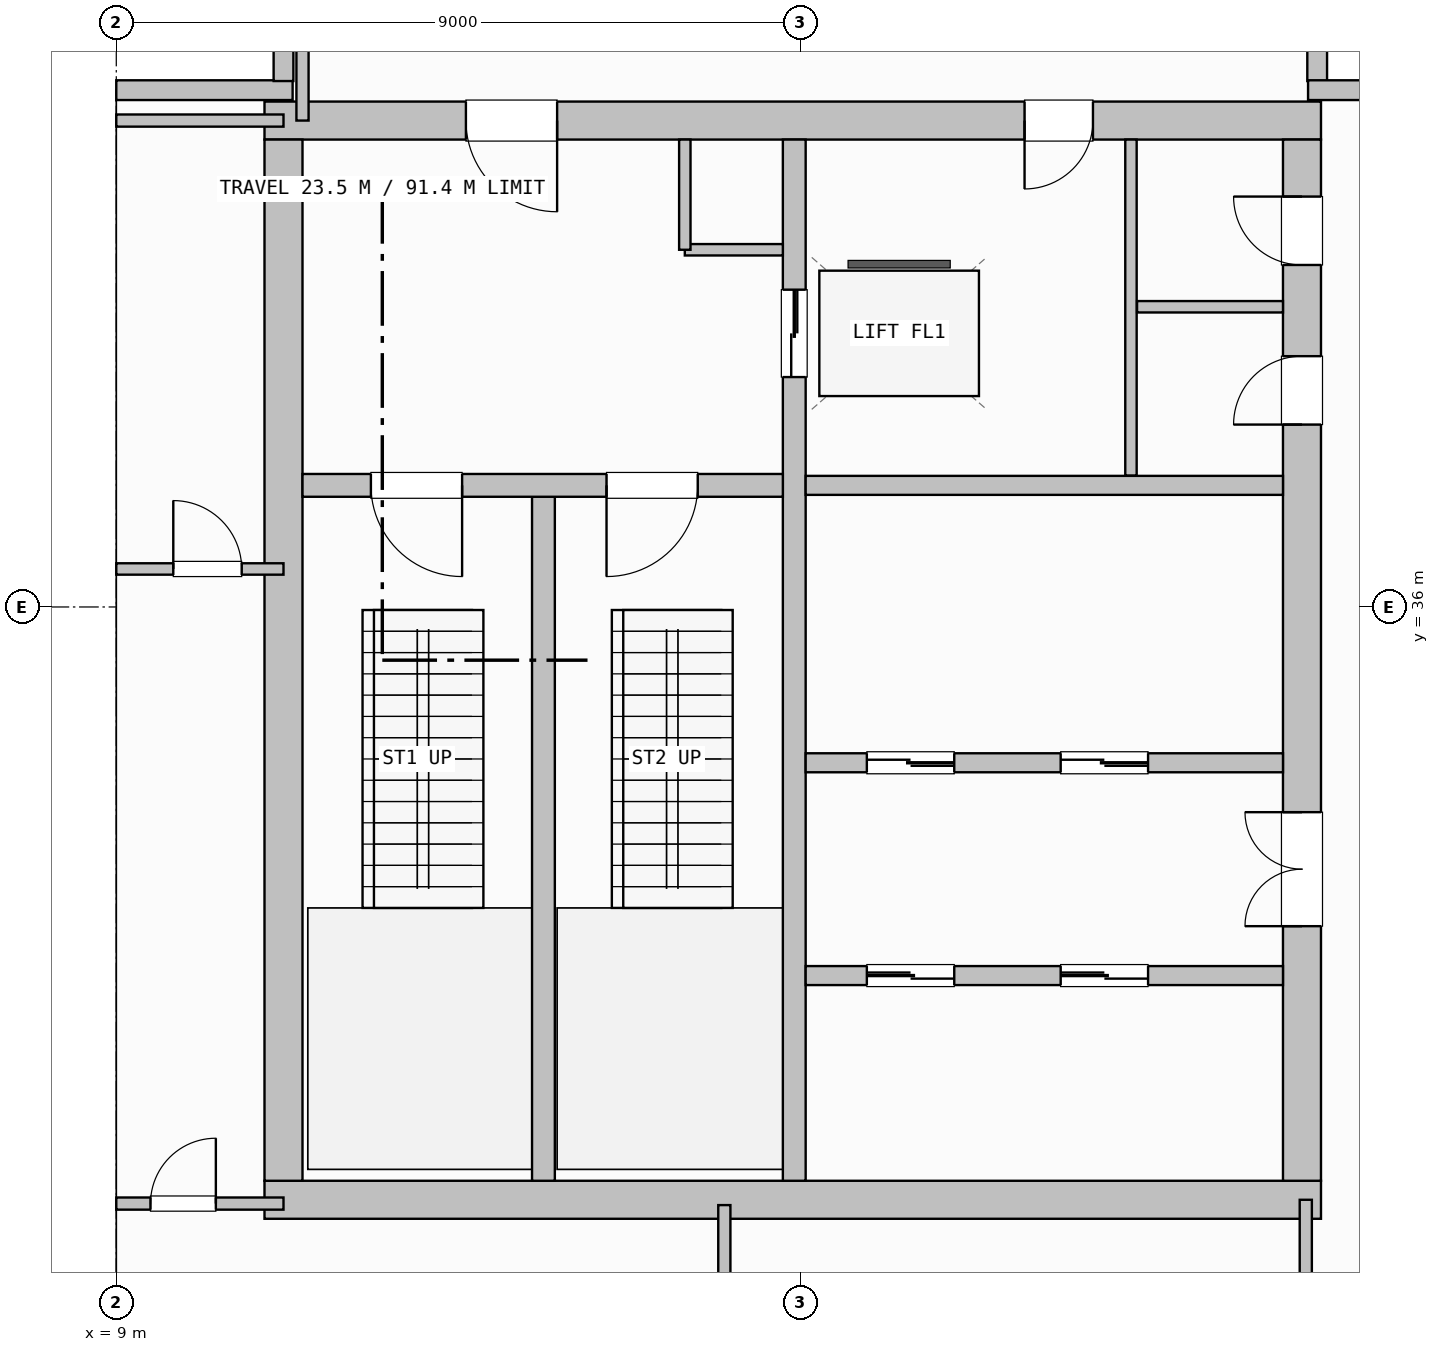
"""IFC4 building model, lengths in metres.
Left out: names, types, materials, properties, quantities, classifications, styles, units other than length and angle.
Written with IfcOpenShell. Run it as: python <this file> out.ifc"""

import sys

from ifc_helpers import new_model, si_unit, direction, frame, frame_2d, origin, origin_2d, place, context, subcontext, project, spatial, rectangle, i_section, extrude, element, fill, save


model = new_model("IFC4")
c1 = context("Model", 3, precision=1e-05, world=origin(), true_north=direction((0.0, 1.0)))
c2 = subcontext(c1, "Body", "Model", "MODEL_VIEW")
j1 = project(units=[si_unit("LENGTHUNIT", "METRE"), si_unit("PLANEANGLEUNIT", "RADIAN")], contexts=[c1])
p1 = place(None, origin())
s1 = spatial("IfcSite", under=j1, at=p1, CompositionType="ELEMENT")
p2 = place(p1, origin())
s2 = spatial("IfcBuilding", under=s1, at=p2, CompositionType="ELEMENT")
p3 = place(p2, frame((0.0, 0.0, 201.2)))
s3 = spatial("IfcBuildingStorey", under=s2, at=p3, CompositionType="ELEMENT", Elevation=201.2)
p4 = place(p3, frame((9.0, 36.0, 0.0), z_axis=(0.0, 0.0, 1.0), x_axis=(1.0, 0.0, 0.0)))
e1 = element("IfcColumn", 1, at=p4, inside=s3, PredefinedType="COLUMN", context=c2, shape_type="SweptSolid", body=[
    extrude(i_section(OverallWidth=0.401, OverallDepth=0.399, WebThickness=0.025, FlangeThickness=0.04, FilletRadius=0.015, at=origin_2d()), origin(), (0.0, 0.0, 1.0), 5.0),
])
p5 = place(p3, frame((9.0, 42.8, 0.0), z_axis=(0.0, 0.0, 1.0), x_axis=(1.0, 0.0, 0.0)))
e2 = element("IfcWall", 2, at=p5, inside=s3, PredefinedType="SOLIDWALL", context=c2, shape_type="SweptSolid", body=[
    extrude(rectangle(XDim=2.32, YDim=0.26, at=frame_2d((1.16, 0.0))), origin(), (0.0, 0.0, 1.0), 4.72),
])
for number, where, z_axis, x_axis in (
    (3, (11.2, 42.92, 0.0), (0.0, 0.0, 1.0), (0.0, 1.0, 0.0)),
    (4, (24.8, 45.0, 0.0), (0.0, 0.0, 1.0), (0.0, -1.0, 0.0)),
):
    element("IfcWall", number, at=place(p3, frame(where, z_axis=z_axis, x_axis=x_axis)), inside=s3, PredefinedType="SOLIDWALL", context=c2, shape_type="SweptSolid", body=[
        extrude(rectangle(XDim=2.08, YDim=0.26, at=frame_2d((1.04, 0.0))), origin(), (0.0, 0.0, 1.0), 4.72),
    ])
p6 = place(p3, frame((24.68, 42.8, 0.0), z_axis=(0.0, 0.0, 1.0), x_axis=(1.0, 0.0, 0.0)))
e5 = element("IfcWall", 5, at=p6, inside=s3, PredefinedType="SOLIDWALL", context=c2, shape_type="SweptSolid", body=[
    extrude(rectangle(XDim=2.32, YDim=0.26, at=frame_2d((1.16, 0.0))), origin(), (0.0, 0.0, 1.0), 4.72),
])
p7 = place(p3, frame((10.95, 28.2, 0.0), z_axis=(0.0, 0.0, 1.0), x_axis=(1.0, 0.0, 0.0)))
e6 = element("IfcWall", 6, at=p7, inside=s3, PredefinedType="SHEAR", context=c2, shape_type="SweptSolid", body=[
    extrude(rectangle(XDim=13.9, YDim=0.5, at=frame_2d((6.95, 0.0))), origin(), (0.0, 0.0, 1.0), 4.72),
])
p8 = place(p3, frame((24.85, 42.4, 0.0), z_axis=(0.0, 0.0, 1.0), x_axis=(-1.0, 0.0, 0.0)))
e7 = element("IfcWall", 7, at=p8, inside=s3, PredefinedType="SHEAR", context=c2, shape_type="SweptSolid", body=[
    extrude(rectangle(XDim=13.9, YDim=0.5, at=frame_2d((6.95, 0.0))), origin(), (0.0, 0.0, 1.0), 4.72),
])
p9 = place(p8, frame((10.05, 0.0, 0.0)))
e8 = element("IfcOpeningElement", 8, at=p9, cuts=e7, PredefinedType="OPENING", context=c2, shape_type="SweptSolid", body=[
    extrude(rectangle(XDim=1.2, YDim=2.15, at=frame_2d((0.6, 1.075))), frame((0.0, 0.26, 0.0), z_axis=(0.0, -1.0, 0.0), x_axis=(1.0, 0.0, 0.0)), (0.0, 0.0, 1.0), 0.52),
])
p10 = place(p8, frame((3.0, 0.0, 0.0)))
e9 = element("IfcOpeningElement", 9, at=p10, cuts=e7, PredefinedType="OPENING", context=c2, shape_type="SweptSolid", body=[
    extrude(rectangle(XDim=0.9, YDim=2.1, at=frame_2d((0.45, 1.05))), frame((0.0, 0.26, 0.0), z_axis=(0.0, -1.0, 0.0), x_axis=(1.0, 0.0, 0.0)), (0.0, 0.0, 1.0), 0.52),
])
p11 = place(p3, frame((11.2, 42.15, 0.0), z_axis=(0.0, 0.0, 1.0), x_axis=(0.0, -1.0, 0.0)))
e10 = element("IfcWall", 10, at=p11, inside=s3, PredefinedType="SHEAR", context=c2, shape_type="SweptSolid", body=[
    extrude(rectangle(XDim=13.7, YDim=0.5, at=frame_2d((6.85, 0.0))), origin(), (0.0, 0.0, 1.0), 4.72),
])
p12 = place(p3, frame((24.6, 28.45, 0.0), z_axis=(0.0, 0.0, 1.0), x_axis=(0.0, 1.0, 0.0)))
e11 = element("IfcWall", 11, at=p12, inside=s3, PredefinedType="SHEAR", context=c2, shape_type="SweptSolid", body=[
    extrude(rectangle(XDim=13.7, YDim=0.5, at=frame_2d((6.85, 0.0))), origin(), (0.0, 0.0, 1.0), 4.72),
])
p13 = place(p12, frame((3.35, 0.0, 0.0)))
e12 = element("IfcOpeningElement", 12, at=p13, cuts=e11, PredefinedType="OPENING", context=c2, shape_type="SweptSolid", body=[
    extrude(rectangle(XDim=1.5, YDim=2.2, at=frame_2d((0.75, 1.1))), frame((0.0, 0.26, 0.0), z_axis=(0.0, -1.0, 0.0), x_axis=(1.0, 0.0, 0.0)), (0.0, 0.0, 1.0), 0.52),
])
p14 = place(p12, frame((9.95, 0.0, 0.0)))
e13 = element("IfcOpeningElement", 13, at=p14, cuts=e11, PredefinedType="OPENING", context=c2, shape_type="SweptSolid", body=[
    extrude(rectangle(XDim=0.9, YDim=2.1, at=frame_2d((0.45, 1.05))), frame((0.0, 0.26, 0.0), z_axis=(0.0, -1.0, 0.0), x_axis=(1.0, 0.0, 0.0)), (0.0, 0.0, 1.0), 0.52),
])
p15 = place(p12, frame((12.05, 0.0, 0.0)))
e14 = element("IfcOpeningElement", 14, at=p15, cuts=e11, PredefinedType="OPENING", context=c2, shape_type="SweptSolid", body=[
    extrude(rectangle(XDim=0.9, YDim=2.1, at=frame_2d((0.45, 1.05))), frame((0.0, 0.26, 0.0), z_axis=(0.0, -1.0, 0.0), x_axis=(1.0, 0.0, 0.0)), (0.0, 0.0, 1.0), 0.52),
])
p16 = place(p3, frame((14.62, 28.45, 0.0), z_axis=(0.0, 0.0, 1.0), x_axis=(0.0, 1.0, 0.0)))
e15 = element("IfcWall", 15, at=p16, inside=s3, PredefinedType="SHEAR", context=c2, shape_type="SweptSolid", body=[
    extrude(rectangle(XDim=9.0, YDim=0.3, at=frame_2d((4.5, 0.0))), origin(), (0.0, 0.0, 1.0), 4.72),
])
p17 = place(p3, frame((17.92, 42.15, 0.0), z_axis=(0.0, 0.0, 1.0), x_axis=(0.0, -1.0, 0.0)))
e16 = element("IfcWall", 16, at=p17, inside=s3, PredefinedType="SHEAR", context=c2, shape_type="SweptSolid", body=[
    extrude(rectangle(XDim=13.7, YDim=0.3, at=frame_2d((6.85, 0.0))), origin(), (0.0, 0.0, 1.0), 4.72),
])
p18 = place(p17, frame((1.975, 0.0, 0.0)))
e17 = element("IfcOpeningElement", 17, at=p18, cuts=e16, PredefinedType="OPENING", context=c2, shape_type="SweptSolid", body=[
    extrude(rectangle(XDim=1.15, YDim=2.15, at=frame_2d((0.575, 1.075))), frame((0.0, 0.16, 0.0), z_axis=(0.0, -1.0, 0.0), x_axis=(1.0, 0.0, 0.0)), (0.0, 0.0, 1.0), 0.32),
])
p19 = place(p3, frame((17.77, 37.6, 0.0), z_axis=(0.0, 0.0, 1.0), x_axis=(-1.0, 0.0, 0.0)))
e18 = element("IfcWall", 18, at=p19, inside=s3, PredefinedType="SHEAR", context=c2, shape_type="SweptSolid", body=[
    extrude(rectangle(XDim=6.32, YDim=0.3, at=frame_2d((3.16, 0.0))), origin(), (0.0, 0.0, 1.0), 4.72),
])
p20 = place(p19, frame((4.22, 0.0, 0.0)))
e19 = element("IfcOpeningElement", 19, at=p20, cuts=e18, PredefinedType="OPENING", context=c2, shape_type="SweptSolid", body=[
    extrude(rectangle(XDim=1.2, YDim=2.15, at=frame_2d((0.6, 1.075))), frame((0.0, 0.16, 0.0), z_axis=(0.0, -1.0, 0.0), x_axis=(1.0, 0.0, 0.0)), (0.0, 0.0, 1.0), 0.32),
])
p21 = place(p19, frame((1.12, 0.0, 0.0)))
e20 = element("IfcOpeningElement", 20, at=p21, cuts=e18, PredefinedType="OPENING", context=c2, shape_type="SweptSolid", body=[
    extrude(rectangle(XDim=1.2, YDim=2.15, at=frame_2d((0.6, 1.075))), frame((0.0, 0.16, 0.0), z_axis=(0.0, -1.0, 0.0), x_axis=(1.0, 0.0, 0.0)), (0.0, 0.0, 1.0), 0.32),
])
p22 = place(p3, frame((16.48, 40.7, 0.0), z_axis=(0.0, 0.0, 1.0), x_axis=(1.0, 0.0, 0.0)))
e21 = element("IfcWall", 21, at=p22, inside=s3, PredefinedType="PARTITIONING", context=c2, shape_type="SweptSolid", body=[
    extrude(rectangle(XDim=1.29, YDim=0.15, at=frame_2d((0.645, 0.0))), origin(), (0.0, 0.0, 1.0), 4.72),
])
p23 = place(p3, frame((16.48, 40.7, 0.0), z_axis=(0.0, 0.0, 1.0), x_axis=(0.0, 1.0, 0.0)))
e22 = element("IfcWall", 22, at=p23, inside=s3, PredefinedType="PARTITIONING", context=c2, shape_type="SweptSolid", body=[
    extrude(rectangle(XDim=1.45, YDim=0.15, at=frame_2d((0.725, 0.0))), origin(), (0.0, 0.0, 1.0), 4.72),
])
p24 = place(p3, frame((18.07, 37.6, 0.0), z_axis=(0.0, 0.0, 1.0), x_axis=(1.0, 0.0, 0.0)))
e23 = element("IfcWall", 23, at=p24, inside=s3, PredefinedType="PARTITIONING", context=c2, shape_type="SweptSolid", body=[
    extrude(rectangle(XDim=6.28, YDim=0.25, at=frame_2d((3.14, 0.0))), origin(), (0.0, 0.0, 1.0), 4.72),
])
p25 = place(p3, frame((18.07, 31.15, 0.0), z_axis=(0.0, 0.0, 1.0), x_axis=(1.0, 0.0, 0.0)))
e24 = element("IfcWall", 24, at=p25, inside=s3, PredefinedType="PARTITIONING", context=c2, shape_type="SweptSolid", body=[
    extrude(rectangle(XDim=6.28, YDim=0.25, at=frame_2d((3.14, 0.0))), origin(), (0.0, 0.0, 1.0), 4.72),
])
p26 = place(p25, frame((0.805, 0.0, 0.0)))
e25 = element("IfcOpeningElement", 25, at=p26, cuts=e24, PredefinedType="OPENING", context=c2, shape_type="SweptSolid", body=[
    extrude(rectangle(XDim=1.15, YDim=2.15, at=frame_2d((0.575, 1.075))), frame((0.0, 0.135, 0.0), z_axis=(0.0, -1.0, 0.0), x_axis=(1.0, 0.0, 0.0)), (0.0, 0.0, 1.0), 0.27),
])
p27 = place(p25, frame((3.355, 0.0, 0.0)))
e26 = element("IfcOpeningElement", 26, at=p27, cuts=e24, PredefinedType="OPENING", context=c2, shape_type="SweptSolid", body=[
    extrude(rectangle(XDim=1.15, YDim=2.15, at=frame_2d((0.575, 1.075))), frame((0.0, 0.135, 0.0), z_axis=(0.0, -1.0, 0.0), x_axis=(1.0, 0.0, 0.0)), (0.0, 0.0, 1.0), 0.27),
])
p28 = place(p3, frame((24.35, 33.95, 0.0), z_axis=(0.0, 0.0, 1.0), x_axis=(-1.0, 0.0, 0.0)))
e27 = element("IfcWall", 27, at=p28, inside=s3, PredefinedType="PARTITIONING", context=c2, shape_type="SweptSolid", body=[
    extrude(rectangle(XDim=6.28, YDim=0.25, at=frame_2d((3.14, 0.0))), origin(), (0.0, 0.0, 1.0), 4.72),
])
p29 = place(p28, frame((4.325, 0.0, 0.0)))
e28 = element("IfcOpeningElement", 28, at=p29, cuts=e27, PredefinedType="OPENING", context=c2, shape_type="SweptSolid", body=[
    extrude(rectangle(XDim=1.15, YDim=2.15, at=frame_2d((0.575, 1.075))), frame((0.0, 0.135, 0.0), z_axis=(0.0, -1.0, 0.0), x_axis=(1.0, 0.0, 0.0)), (0.0, 0.0, 1.0), 0.27),
])
p30 = place(p28, frame((1.775, 0.0, 0.0)))
e29 = element("IfcOpeningElement", 29, at=p30, cuts=e27, PredefinedType="OPENING", context=c2, shape_type="SweptSolid", body=[
    extrude(rectangle(XDim=1.15, YDim=2.15, at=frame_2d((0.575, 1.075))), frame((0.0, 0.135, 0.0), z_axis=(0.0, -1.0, 0.0), x_axis=(1.0, 0.0, 0.0)), (0.0, 0.0, 1.0), 0.27),
])
p31 = place(p3, frame((22.35, 37.73, 0.0), z_axis=(0.0, 0.0, 1.0), x_axis=(0.0, 1.0, 0.0)))
e30 = element("IfcWall", 30, at=p31, inside=s3, PredefinedType="PARTITIONING", context=c2, shape_type="SweptSolid", body=[
    extrude(rectangle(XDim=4.42, YDim=0.15, at=frame_2d((2.21, 0.0))), origin(), (0.0, 0.0, 1.0), 4.72),
])
p32 = place(p3, frame((22.43, 39.95, 0.0), z_axis=(0.0, 0.0, 1.0), x_axis=(1.0, 0.0, 0.0)))
e31 = element("IfcWall", 31, at=p32, inside=s3, PredefinedType="PARTITIONING", context=c2, shape_type="SweptSolid", body=[
    extrude(rectangle(XDim=1.92, YDim=0.15, at=frame_2d((0.96, 0.0))), origin(), (0.0, 0.0, 1.0), 4.72),
])
p33 = place(p3, frame((9.0, 28.15, 0.0), z_axis=(0.0, 0.0, 1.0), x_axis=(1.0, 0.0, 0.0)))
e32 = element("IfcWall", 32, at=p33, inside=s3, PredefinedType="PARTITIONING", context=c2, shape_type="SweptSolid", body=[
    extrude(rectangle(XDim=2.2, YDim=0.16, at=frame_2d((1.1, 0.0))), origin(), (0.0, 0.0, 1.0), 4.007),
])
p34 = place(p33, frame((0.45, 0.0, 0.0)))
e33 = element("IfcOpeningElement", 33, at=p34, cuts=e32, PredefinedType="OPENING", context=c2, shape_type="SweptSolid", body=[
    extrude(rectangle(XDim=0.86, YDim=2.05, at=frame_2d((0.43, 1.025))), frame((0.0, 0.09, 0.0), z_axis=(0.0, -1.0, 0.0), x_axis=(1.0, 0.0, 0.0)), (0.0, 0.0, 1.0), 0.18),
])
p35 = place(p3, frame((9.0, 42.4, 0.0), z_axis=(0.0, 0.0, 1.0), x_axis=(1.0, 0.0, 0.0)))
e34 = element("IfcWall", 34, at=p35, inside=s3, PredefinedType="PARTITIONING", context=c2, shape_type="SweptSolid", body=[
    extrude(rectangle(XDim=2.2, YDim=0.16, at=frame_2d((1.1, 0.0))), origin(), (0.0, 0.0, 1.0), 4.72),
])
p36 = place(p3, frame((11.45, 42.4, 0.0), z_axis=(0.0, 0.0, 1.0), x_axis=(0.0, 1.0, 0.0)))
e35 = element("IfcWall", 35, at=p36, inside=s3, PredefinedType="PARTITIONING", context=c2, shape_type="SweptSolid", body=[
    extrude(rectangle(XDim=2.666, YDim=0.16, at=frame_2d((1.333, 0.0))), origin(), (0.0, 0.0, 1.0), 4.72),
])
p37 = place(p3, frame((9.0, 36.5, 0.0), z_axis=(0.0, 0.0, 1.0), x_axis=(1.0, 0.0, 0.0)))
e36 = element("IfcWall", 36, at=p37, inside=s3, PredefinedType="PARTITIONING", context=c2, shape_type="SweptSolid", body=[
    extrude(rectangle(XDim=2.2, YDim=0.15, at=frame_2d((1.1, 0.0))), origin(), (0.0, 0.0, 1.0), 4.72),
])
p38 = place(p37, frame((0.75, 0.0, 0.0)))
e37 = element("IfcOpeningElement", 37, at=p38, cuts=e36, PredefinedType="OPENING", context=c2, shape_type="SweptSolid", body=[
    extrude(rectangle(XDim=0.9, YDim=2.1, at=frame_2d((0.45, 1.05))), frame((0.0, 0.085, 0.0), z_axis=(0.0, -1.0, 0.0), x_axis=(1.0, 0.0, 0.0)), (0.0, 0.0, 1.0), 0.17),
])
p39 = place(p3, frame((24.65, 9.0, 0.0), z_axis=(0.0, 0.0, 1.0), x_axis=(0.0, 1.0, 0.0)))
e38 = element("IfcWall", 38, at=p39, inside=s3, PredefinedType="PARTITIONING", context=c2, shape_type="SweptSolid", body=[
    extrude(rectangle(XDim=19.2, YDim=0.16, at=frame_2d((9.6, 0.0))), origin(), (0.0, 0.0, 1.0), 4.007),
])
p40 = place(p39, frame((12.2, 0.0, 0.0)))
e39 = element("IfcOpeningElement", 39, at=p40, cuts=e38, PredefinedType="OPENING", context=c2, shape_type="SweptSolid", body=[
    extrude(rectangle(XDim=1.0, YDim=2.1, at=frame_2d((0.5, 1.05))), frame((0.0, 0.09, 0.0), z_axis=(0.0, -1.0, 0.0), x_axis=(1.0, 0.0, 0.0)), (0.0, 0.0, 1.0), 0.18),
])
p41 = place(p39, frame((4.2, 0.0, 0.0)))
e40 = element("IfcOpeningElement", 40, at=p41, cuts=e38, PredefinedType="OPENING", context=c2, shape_type="SweptSolid", body=[
    extrude(rectangle(XDim=1.05, YDim=2.15, at=frame_2d((0.525, 1.075))), frame((0.0, 0.09, 0.0), z_axis=(0.0, -1.0, 0.0), x_axis=(1.0, 0.0, 0.0)), (0.0, 0.0, 1.0), 0.18),
])
p42 = place(p3, frame((17.0, 18.0, 0.0), z_axis=(0.0, 0.0, 1.0), x_axis=(0.0, 1.0, 0.0)))
e41 = element("IfcWall", 41, at=p42, inside=s3, PredefinedType="PARTITIONING", context=c2, shape_type="SweptSolid", body=[
    extrude(rectangle(XDim=10.13, YDim=0.16, at=frame_2d((5.065, 0.0))), origin(), (0.0, 0.0, 1.0), 4.089),
])
p43 = place(p42, frame((2.5, 0.0, 0.0)))
e42 = element("IfcOpeningElement", 42, at=p43, cuts=e41, PredefinedType="OPENING", context=c2, shape_type="SweptSolid", body=[
    extrude(rectangle(XDim=1.2, YDim=2.15, at=frame_2d((0.6, 1.075))), frame((0.0, 0.09, 0.0), z_axis=(0.0, -1.0, 0.0), x_axis=(1.0, 0.0, 0.0)), (0.0, 0.0, 1.0), 0.18),
])
p44 = place(p20, origin())
e43 = element("IfcDoor", 43, at=p44, inside=s3, OperationType="SINGLE_SWING_LEFT", PredefinedType="DOOR", context=c2, shape_type="SweptSolid", body=[
    extrude(rectangle(XDim=1.2, YDim=2.15, at=frame_2d((0.6, 1.075))), frame((0.0, 0.025, 0.0), z_axis=(0.0, -1.0, 0.0), x_axis=(1.0, 0.0, 0.0)), (0.0, 0.0, 1.0), 0.05),
])
fill(e19, e43)
p45 = place(p21, origin())
e44 = element("IfcDoor", 44, at=p45, inside=s3, OperationType="SINGLE_SWING_RIGHT", PredefinedType="DOOR", context=c2, shape_type="SweptSolid", body=[
    extrude(rectangle(XDim=1.2, YDim=2.15, at=frame_2d((0.6, 1.075))), frame((0.0, 0.025, 0.0), z_axis=(0.0, -1.0, 0.0), x_axis=(1.0, 0.0, 0.0)), (0.0, 0.0, 1.0), 0.05),
])
fill(e20, e44)
p46 = place(p13, origin())
e45 = element("IfcDoor", 45, at=p46, inside=s3, OperationType="DOUBLE_DOOR_SINGLE_SWING", PredefinedType="DOOR", context=c2, shape_type="SweptSolid", body=[
    extrude(rectangle(XDim=1.5, YDim=2.2, at=frame_2d((0.75, 1.1))), frame((0.0, 0.025, 0.0), z_axis=(0.0, -1.0, 0.0), x_axis=(1.0, 0.0, 0.0)), (0.0, 0.0, 1.0), 0.05),
])
fill(e12, e45)
p47 = place(p9, origin())
e46 = element("IfcDoor", 46, at=p47, inside=s3, OperationType="SINGLE_SWING_LEFT", PredefinedType="DOOR", context=c2, shape_type="SweptSolid", body=[
    extrude(rectangle(XDim=1.2, YDim=2.15, at=frame_2d((0.6, 1.075))), frame((0.0, 0.025, 0.0), z_axis=(0.0, -1.0, 0.0), x_axis=(1.0, 0.0, 0.0)), (0.0, 0.0, 1.0), 0.05),
])
fill(e8, e46)
p48 = place(p14, origin())
e47 = element("IfcDoor", 47, at=p48, inside=s3, OperationType="SINGLE_SWING_LEFT", PredefinedType="DOOR", context=c2, shape_type="SweptSolid", body=[
    extrude(rectangle(XDim=0.9, YDim=2.1, at=frame_2d((0.45, 1.05))), frame((0.0, 0.025, 0.0), z_axis=(0.0, -1.0, 0.0), x_axis=(1.0, 0.0, 0.0)), (0.0, 0.0, 1.0), 0.05),
])
fill(e13, e47)
p49 = place(p10, origin())
e48 = element("IfcDoor", 48, at=p49, inside=s3, OperationType="SINGLE_SWING_RIGHT", PredefinedType="DOOR", context=c2, shape_type="SweptSolid", body=[
    extrude(rectangle(XDim=0.9, YDim=2.1, at=frame_2d((0.45, 1.05))), frame((0.0, 0.025, 0.0), z_axis=(0.0, -1.0, 0.0), x_axis=(1.0, 0.0, 0.0)), (0.0, 0.0, 1.0), 0.05),
])
fill(e9, e48)
p50 = place(p15, origin())
e49 = element("IfcDoor", 49, at=p50, inside=s3, OperationType="SINGLE_SWING_RIGHT", PredefinedType="DOOR", context=c2, shape_type="SweptSolid", body=[
    extrude(rectangle(XDim=0.9, YDim=2.1, at=frame_2d((0.45, 1.05))), frame((0.0, 0.025, 0.0), z_axis=(0.0, -1.0, 0.0), x_axis=(1.0, 0.0, 0.0)), (0.0, 0.0, 1.0), 0.05),
])
fill(e14, e49)
p51 = place(p18, origin())
e50 = element("IfcDoor", 50, at=p51, inside=s3, OperationType="DOUBLE_DOOR_SLIDING", PredefinedType="DOOR", context=c2, shape_type="SweptSolid", body=[
    extrude(rectangle(XDim=1.15, YDim=2.15, at=frame_2d((0.575, 1.075))), frame((0.0, 0.025, 0.0), z_axis=(0.0, -1.0, 0.0), x_axis=(1.0, 0.0, 0.0)), (0.0, 0.0, 1.0), 0.05),
])
fill(e17, e50)
p52 = place(p26, origin())
e51 = element("IfcDoor", 51, at=p52, inside=s3, OperationType="DOUBLE_DOOR_SLIDING", PredefinedType="DOOR", context=c2, shape_type="SweptSolid", body=[
    extrude(rectangle(XDim=1.15, YDim=2.15, at=frame_2d((0.575, 1.075))), frame((0.0, 0.025, 0.0), z_axis=(0.0, -1.0, 0.0), x_axis=(1.0, 0.0, 0.0)), (0.0, 0.0, 1.0), 0.05),
])
fill(e25, e51)
p53 = place(p27, origin())
e52 = element("IfcDoor", 52, at=p53, inside=s3, OperationType="DOUBLE_DOOR_SLIDING", PredefinedType="DOOR", context=c2, shape_type="SweptSolid", body=[
    extrude(rectangle(XDim=1.15, YDim=2.15, at=frame_2d((0.575, 1.075))), frame((0.0, 0.025, 0.0), z_axis=(0.0, -1.0, 0.0), x_axis=(1.0, 0.0, 0.0)), (0.0, 0.0, 1.0), 0.05),
])
fill(e26, e52)
p54 = place(p29, origin())
e53 = element("IfcDoor", 53, at=p54, inside=s3, OperationType="DOUBLE_DOOR_SLIDING", PredefinedType="DOOR", context=c2, shape_type="SweptSolid", body=[
    extrude(rectangle(XDim=1.15, YDim=2.15, at=frame_2d((0.575, 1.075))), frame((0.0, 0.025, 0.0), z_axis=(0.0, -1.0, 0.0), x_axis=(1.0, 0.0, 0.0)), (0.0, 0.0, 1.0), 0.05),
])
fill(e28, e53)
p55 = place(p30, origin())
e54 = element("IfcDoor", 54, at=p55, inside=s3, OperationType="DOUBLE_DOOR_SLIDING", PredefinedType="DOOR", context=c2, shape_type="SweptSolid", body=[
    extrude(rectangle(XDim=1.15, YDim=2.15, at=frame_2d((0.575, 1.075))), frame((0.0, 0.025, 0.0), z_axis=(0.0, -1.0, 0.0), x_axis=(1.0, 0.0, 0.0)), (0.0, 0.0, 1.0), 0.05),
])
fill(e29, e54)
p56 = place(p34, origin())
e55 = element("IfcDoor", 55, at=p56, inside=s3, OperationType="SINGLE_SWING_RIGHT", PredefinedType="DOOR", context=c2, shape_type="SweptSolid", body=[
    extrude(rectangle(XDim=0.86, YDim=2.05, at=frame_2d((0.43, 1.025))), frame((0.0, 0.025, 0.0), z_axis=(0.0, -1.0, 0.0), x_axis=(1.0, 0.0, 0.0)), (0.0, 0.0, 1.0), 0.05),
])
fill(e33, e55)
p57 = place(p38, origin())
e56 = element("IfcDoor", 56, at=p57, inside=s3, OperationType="SINGLE_SWING_LEFT", PredefinedType="DOOR", context=c2, shape_type="SweptSolid", body=[
    extrude(rectangle(XDim=0.9, YDim=2.1, at=frame_2d((0.45, 1.05))), frame((0.0, 0.025, 0.0), z_axis=(0.0, -1.0, 0.0), x_axis=(1.0, 0.0, 0.0)), (0.0, 0.0, 1.0), 0.05),
])
fill(e37, e56)
save(model, sys.argv[1])
